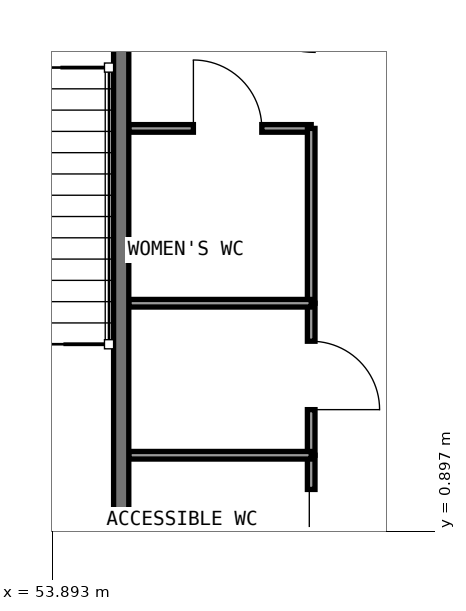
"""IFC4 building model, lengths in metres.
Left out: names, types, materials, properties, quantities, classifications, styles, units other than length and angle.
Written with IfcOpenShell. Run it as: python <this file> out.ifc"""

import sys

from ifc_helpers import new_model, si_unit, direction, frame, frame_2d, origin, place, context, subcontext, project, spatial, rectangle, extrude, element, fill, save


model = new_model("IFC4")
c1 = context("Model", 3, precision=1e-05, world=origin(), true_north=direction((0.0, 1.0)))
c2 = subcontext(c1, "Body", "Model", "MODEL_VIEW")
j1 = project(units=[si_unit("LENGTHUNIT", "METRE"), si_unit("PLANEANGLEUNIT", "RADIAN")], contexts=[c1])
p1 = place(None, origin())
s1 = spatial("IfcSite", under=j1, at=p1, CompositionType="ELEMENT")
p2 = place(p1, origin())
s2 = spatial("IfcBuilding", under=s1, at=p2, CompositionType="ELEMENT")
p3 = place(p2, frame((0.0, 0.0, 11.4)))
s3 = spatial("IfcBuildingStorey", under=s2, at=p3, CompositionType="ELEMENT", Elevation=11.4)
p4 = place(p3, frame((54.9, 6.2, 0.0), z_axis=(0.0, 0.0, 1.0), x_axis=(1.0, 0.0, 0.0)))
e1 = element("IfcWall", 1, at=p4, inside=s3, PredefinedType="PARTITIONING", context=c2, shape_type="SweptSolid", body=[
    extrude(rectangle(XDim=2.4, YDim=0.1, at=frame_2d((1.2, 0.0))), origin(), (0.0, 0.0, 1.0), 4.58),
])
p5 = place(p4, frame((0.85, 0.0, 0.0)))
e2 = element("IfcOpeningElement", 2, at=p5, cuts=e1, PredefinedType="OPENING", context=c2, shape_type="SweptSolid", body=[
    extrude(rectangle(XDim=0.9, YDim=2.1, at=frame_2d((0.45, 1.05))), frame((0.0, 0.06, 0.0), z_axis=(0.0, -1.0, 0.0), x_axis=(1.0, 0.0, 0.0)), (0.0, 0.0, 1.0), 0.12),
])
p6 = place(p3, frame((57.3, 3.9, 0.0), z_axis=(0.0, 0.0, 1.0), x_axis=(0.0, 1.0, 0.0)))
e3 = element("IfcWall", 3, at=p6, inside=s3, PredefinedType="PARTITIONING", context=c2, shape_type="SweptSolid", body=[
    extrude(rectangle(XDim=2.3, YDim=0.1, at=frame_2d((1.15, 0.0))), origin(), (0.0, 0.0, 1.0), 4.58),
])
p7 = place(p3, frame((57.3, 1.9, 0.0), z_axis=(0.0, 0.0, 1.0), x_axis=(0.0, 1.0, 0.0)))
e4 = element("IfcWall", 4, at=p7, inside=s3, PredefinedType="PARTITIONING", context=c2, shape_type="SweptSolid", body=[
    extrude(rectangle(XDim=2.0, YDim=0.1, at=frame_2d((1.0, 0.0))), origin(), (0.0, 0.0, 1.0), 4.58),
])
p8 = place(p7, frame((0.6, 0.0, 0.0)))
e5 = element("IfcOpeningElement", 5, at=p8, cuts=e4, PredefinedType="OPENING", context=c2, shape_type="SweptSolid", body=[
    extrude(rectangle(XDim=0.9, YDim=2.1, at=frame_2d((0.45, 1.05))), frame((0.0, 0.06, 0.0), z_axis=(0.0, -1.0, 0.0), x_axis=(1.0, 0.0, 0.0)), (0.0, 0.0, 1.0), 0.12),
])
p9 = place(p3, frame((57.3, 0.2, 0.0), z_axis=(0.0, 0.0, 1.0), x_axis=(0.0, 1.0, 0.0)))
e6 = element("IfcWall", 6, at=p9, inside=s3, PredefinedType="PARTITIONING", context=c2, shape_type="SweptSolid", body=[
    extrude(rectangle(XDim=1.7, YDim=0.1, at=frame_2d((0.85, 0.0))), origin(), (0.0, 0.0, 1.0), 4.58),
])
p10 = place(p9, frame((0.35, 0.0, 0.0)))
e7 = element("IfcOpeningElement", 7, at=p10, cuts=e6, PredefinedType="OPENING", context=c2, shape_type="SweptSolid", body=[
    extrude(rectangle(XDim=0.9, YDim=2.1, at=frame_2d((0.45, 1.05))), frame((0.0, 0.06, 0.0), z_axis=(0.0, -1.0, 0.0), x_axis=(1.0, 0.0, 0.0)), (0.0, 0.0, 1.0), 0.12),
])
for number, where, z_axis, x_axis in (
    (8, (54.9, 3.9, 0.0), (0.0, 0.0, 1.0), (1.0, 0.0, 0.0)),
    (9, (54.9, 1.9, 0.0), (0.0, 0.0, 1.0), (1.0, 0.0, 0.0)),
):
    element("IfcWall", number, at=place(p3, frame(where, z_axis=z_axis, x_axis=x_axis)), inside=s3, PredefinedType="PARTITIONING", context=c2, shape_type="SweptSolid", body=[
        extrude(rectangle(XDim=2.4, YDim=0.1, at=frame_2d((1.2, 0.0))), origin(), (0.0, 0.0, 1.0), 4.58),
    ])
p11 = place(p3, frame((54.8, 0.2, 0.0), z_axis=(0.0, 0.0, 1.0), x_axis=(0.0, 1.0, 0.0)))
e10 = element("IfcWall", 10, at=p11, inside=s3, PredefinedType="SHEAR", context=c2, shape_type="SweptSolid", body=[
    extrude(rectangle(XDim=8.0, YDim=0.2, at=frame_2d((4.0, 0.0))), origin(), (0.0, 0.0, 1.0), 4.65),
])
p12 = place(p5, origin())
e11 = element("IfcDoor", 11, at=p12, inside=s3, OperationType="SINGLE_SWING_LEFT", PredefinedType="DOOR", context=c2, shape_type="SweptSolid", body=[
    extrude(rectangle(XDim=0.9, YDim=2.1, at=frame_2d((0.45, 1.05))), frame((0.0, 0.025, 0.0), z_axis=(0.0, -1.0, 0.0), x_axis=(1.0, 0.0, 0.0)), (0.0, 0.0, 1.0), 0.05),
])
fill(e2, e11)
p13 = place(p8, frame((0.9, 0.0, 0.0), z_axis=(0.0, 0.0, 1.0), x_axis=(-1.0, 0.0, 0.0)))
e12 = element("IfcDoor", 12, at=p13, inside=s3, OperationType="SINGLE_SWING_RIGHT", PredefinedType="DOOR", context=c2, shape_type="SweptSolid", body=[
    extrude(rectangle(XDim=0.9, YDim=2.1, at=frame_2d((0.45, 1.05))), frame((0.0, 0.025, 0.0), z_axis=(0.0, -1.0, 0.0), x_axis=(1.0, 0.0, 0.0)), (0.0, 0.0, 1.0), 0.05),
])
fill(e5, e12)
p14 = place(p10, origin())
e13 = element("IfcDoor", 13, at=p14, inside=s3, OperationType="SLIDING_TO_RIGHT", PredefinedType="DOOR", context=c2, shape_type="SweptSolid", body=[
    extrude(rectangle(XDim=0.9, YDim=2.1, at=frame_2d((0.45, 1.05))), frame((0.0, 0.025, 0.0), z_axis=(0.0, -1.0, 0.0), x_axis=(1.0, 0.0, 0.0)), (0.0, 0.0, 1.0), 0.05),
])
fill(e7, e13)
save(model, sys.argv[1])
